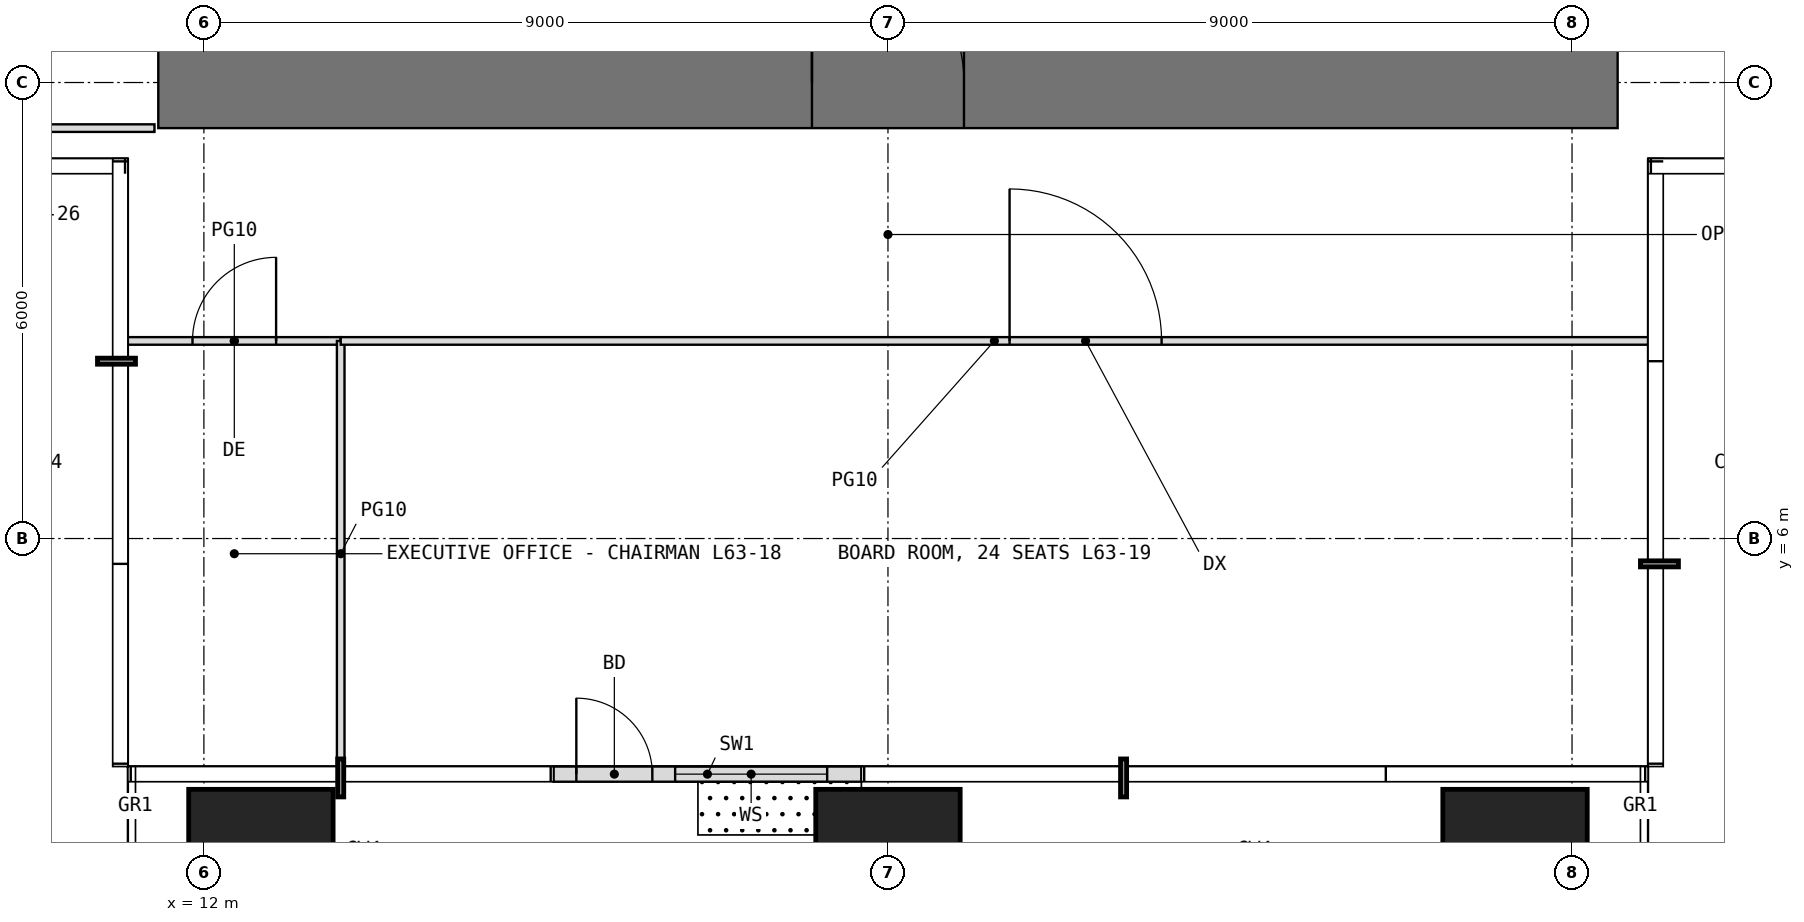
"""IFC4 building model, lengths in metres.
Left out: names, types, materials, properties, quantities, classifications, styles, units other than length and angle.
Written with IfcOpenShell. Run it as: python <this file> out.ifc"""

import sys

from ifc_helpers import new_model, si_unit, direction, frame, frame_2d, origin, origin_2d, place, context, subcontext, project, spatial, rectangle, extrude, element, fill, save


model = new_model("IFC4")
c1 = context("Model", 3, precision=1e-05, world=origin(), true_north=direction((0.0, 1.0)))
c2 = subcontext(c1, "Body", "Model", "MODEL_VIEW")
j1 = project(units=[si_unit("LENGTHUNIT", "METRE"), si_unit("PLANEANGLEUNIT", "RADIAN")], contexts=[c1])
p1 = place(None, origin())
s1 = spatial("IfcSite", under=j1, at=p1, CompositionType="ELEMENT")
p2 = place(p1, origin())
s2 = spatial("IfcBuilding", under=s1, at=p2, CompositionType="ELEMENT")
p3 = place(p2, frame((0.0, 0.0, 265.0)))
s3 = spatial("IfcBuildingStorey", under=s2, at=p3, CompositionType="ELEMENT", Elevation=265.0)
for number, where, z_axis, x_axis in (
    (1, (12.75, 1.75, 0.0), (0.0, 0.0, 1.0), (1.0, 0.0, 0.0)),
    (2, (21.0, 1.75, 0.0), (0.0, 0.0, 1.0), (1.0, 0.0, 0.0)),
    (3, (29.25, 1.75, 0.0), (0.0, 0.0, 1.0), (1.0, 0.0, 0.0)),
):
    element("IfcColumn", number, at=place(p3, frame(where, z_axis=z_axis, x_axis=x_axis)), inside=s3, PredefinedType="COLUMN", context=c2, shape_type="SweptSolid", body=[
        extrude(rectangle(XDim=1.9, YDim=1.9, at=origin_2d()), origin(), (0.0, 0.0, 1.0), 4.2),
    ])
p4 = place(p3, frame((16.6, 2.9, 0.0), z_axis=(0.0, 0.0, 1.0), x_axis=(1.0, 0.0, 0.0)))
e4 = element("IfcWall", 4, at=p4, inside=s3, PredefinedType="USERDEFINED", context=c2, shape_type="SweptSolid", body=[
    extrude(rectangle(XDim=4.05, YDim=0.2, at=frame_2d((2.025, 0.0))), origin(), (0.0, 0.0, 1.0), 3.95),
])
p5 = place(p4, frame((0.3, 0.0, 0.0)))
e5 = element("IfcOpeningElement", 5, at=p5, cuts=e4, PredefinedType="OPENING", context=c2, shape_type="SweptSolid", body=[
    extrude(rectangle(XDim=1.0, YDim=2.4, at=frame_2d((0.5, 1.2))), frame((0.0, 0.11, 0.0), z_axis=(0.0, -1.0, 0.0), x_axis=(1.0, 0.0, 0.0)), (0.0, 0.0, 1.0), 0.22),
])
p6 = place(p4, frame((1.6, 0.0, 0.3)))
e6 = element("IfcOpeningElement", 6, at=p6, cuts=e4, PredefinedType="OPENING", context=c2, shape_type="SweptSolid", body=[
    extrude(rectangle(XDim=2.0, YDim=2.7, at=frame_2d((1.0, 1.35))), frame((0.0, 0.11, 0.0), z_axis=(0.0, -1.0, 0.0), x_axis=(1.0, 0.0, 0.0)), (0.0, 0.0, 1.0), 0.22),
])
p7 = place(p3, frame((11.4, 12.0, -0.05), z_axis=(0.0, 0.0, 1.0), x_axis=(1.0, 0.0, 0.0)))
e7 = element("IfcWall", 7, at=p7, inside=s3, PredefinedType="SHEAR", context=c2, shape_type="SweptSolid", body=[
    extrude(rectangle(XDim=19.2, YDim=1.2, at=frame_2d((9.6, 0.0))), origin(), (0.0, 0.0, 1.0), 4.2),
])
p8 = place(p7, frame((8.6, 0.0, 0.05)))
e8 = element("IfcOpeningElement", 8, at=p8, cuts=e7, PredefinedType="OPENING", context=c2, shape_type="SweptSolid", body=[
    extrude(rectangle(XDim=2.0, YDim=2.2, at=frame_2d((1.0, 1.1))), frame((0.0, 0.61, 0.0), z_axis=(0.0, -1.0, 0.0), x_axis=(1.0, 0.0, 0.0)), (0.0, 0.0, 1.0), 1.22),
])
p9 = place(p3, frame((8.0, 11.4, 0.0), z_axis=(0.0, 0.0, 1.0), x_axis=(1.0, 0.0, 0.0)))
e9 = element("IfcWall", 9, at=p9, inside=s3, PredefinedType="PARTITIONING", context=c2, shape_type="SweptSolid", body=[
    extrude(rectangle(XDim=3.35, YDim=0.1, at=frame_2d((1.675, 0.0))), origin(), (0.0, 0.0, 1.0), 3.95),
])
p10 = place(p3, frame((11.0, 8.6, 0.0), z_axis=(0.0, 0.0, 1.0), x_axis=(1.0, 0.0, 0.0)))
e10 = element("IfcWall", 10, at=p10, inside=s3, PredefinedType="PARTITIONING", context=c2, shape_type="SweptSolid", body=[
    extrude(rectangle(XDim=2.8, YDim=0.1, at=frame_2d((1.4, 0.0))), origin(), (0.0, 0.0, 1.0), 3.95),
])
p11 = place(p10, frame((0.85, 0.0, 0.0)))
e11 = element("IfcOpeningElement", 11, at=p11, cuts=e10, PredefinedType="OPENING", context=c2, shape_type="SweptSolid", body=[
    extrude(rectangle(XDim=1.1, YDim=2.3, at=frame_2d((0.55, 1.15))), frame((0.0, 0.06, 0.0), z_axis=(0.0, -1.0, 0.0), x_axis=(1.0, 0.0, 0.0)), (0.0, 0.0, 1.0), 0.12),
])
p12 = place(p3, frame((13.8, 3.0, 0.0), z_axis=(0.0, 0.0, 1.0), x_axis=(0.0, 1.0, 0.0)))
e12 = element("IfcWall", 12, at=p12, inside=s3, PredefinedType="PARTITIONING", context=c2, shape_type="SweptSolid", body=[
    extrude(rectangle(XDim=5.6, YDim=0.1, at=frame_2d((2.8, 0.0))), origin(), (0.0, 0.0, 1.0), 3.95),
])
p13 = place(p3, frame((13.8, 8.6, 0.0), z_axis=(0.0, 0.0, 1.0), x_axis=(1.0, 0.0, 0.0)))
e13 = element("IfcWall", 13, at=p13, inside=s3, PredefinedType="PARTITIONING", context=c2, shape_type="SweptSolid", body=[
    extrude(rectangle(XDim=17.2, YDim=0.1, at=frame_2d((8.6, 0.0))), origin(), (0.0, 0.0, 1.0), 3.95),
])
p14 = place(p13, frame((8.8, 0.0, 0.0)))
e14 = element("IfcOpeningElement", 14, at=p14, cuts=e13, PredefinedType="OPENING", context=c2, shape_type="SweptSolid", body=[
    extrude(rectangle(XDim=2.0, YDim=2.4, at=frame_2d((1.0, 1.2))), frame((0.0, 0.06, 0.0), z_axis=(0.0, -1.0, 0.0), x_axis=(1.0, 0.0, 0.0)), (0.0, 0.0, 1.0), 0.12),
])
p15 = place(p5, origin())
e15 = element("IfcDoor", 15, at=p15, inside=s3, OperationType="SINGLE_SWING_LEFT", PredefinedType="DOOR", context=c2, shape_type="SweptSolid", body=[
    extrude(rectangle(XDim=1.0, YDim=2.4, at=frame_2d((0.5, 1.2))), frame((0.0, 0.025, 0.0), z_axis=(0.0, -1.0, 0.0), x_axis=(1.0, 0.0, 0.0)), (0.0, 0.0, 1.0), 0.05),
])
fill(e5, e15)
p16 = place(p6, origin())
e16 = element("IfcWindow", 16, at=p16, inside=s3, PartitioningType="SINGLE_PANEL", PredefinedType="WINDOW", context=c2, shape_type="SweptSolid", body=[
    extrude(rectangle(XDim=2.0, YDim=2.7, at=frame_2d((1.0, 1.35))), frame((0.0, 0.03, 0.0), z_axis=(0.0, -1.0, 0.0), x_axis=(1.0, 0.0, 0.0)), (0.0, 0.0, 1.0), 0.06),
])
fill(e6, e16)
p17 = place(p8, origin())
e17 = element("IfcDoor", 17, at=p17, inside=s3, OperationType="DOUBLE_DOOR_SINGLE_SWING", PredefinedType="DOOR", context=c2, shape_type="SweptSolid", body=[
    extrude(rectangle(XDim=2.0, YDim=2.2, at=frame_2d((1.0, 1.1))), frame((0.0, 0.025, 0.0), z_axis=(0.0, -1.0, 0.0), x_axis=(1.0, 0.0, 0.0)), (0.0, 0.0, 1.0), 0.05),
])
fill(e8, e17)
p18 = place(p11, origin())
e18 = element("IfcDoor", 18, at=p18, inside=s3, OperationType="SINGLE_SWING_RIGHT", PredefinedType="DOOR", context=c2, shape_type="SweptSolid", body=[
    extrude(rectangle(XDim=1.1, YDim=2.3, at=frame_2d((0.55, 1.15))), frame((0.0, 0.025, 0.0), z_axis=(0.0, -1.0, 0.0), x_axis=(1.0, 0.0, 0.0)), (0.0, 0.0, 1.0), 0.05),
])
fill(e11, e18)
p19 = place(p14, origin())
e19 = element("IfcDoor", 19, at=p19, inside=s3, OperationType="DOUBLE_DOOR_SINGLE_SWING", PredefinedType="DOOR", context=c2, shape_type="SweptSolid", body=[
    extrude(rectangle(XDim=2.0, YDim=2.4, at=frame_2d((1.0, 1.2))), frame((0.0, 0.025, 0.0), z_axis=(0.0, -1.0, 0.0), x_axis=(1.0, 0.0, 0.0)), (0.0, 0.0, 1.0), 0.05),
])
fill(e14, e19)
save(model, sys.argv[1])
